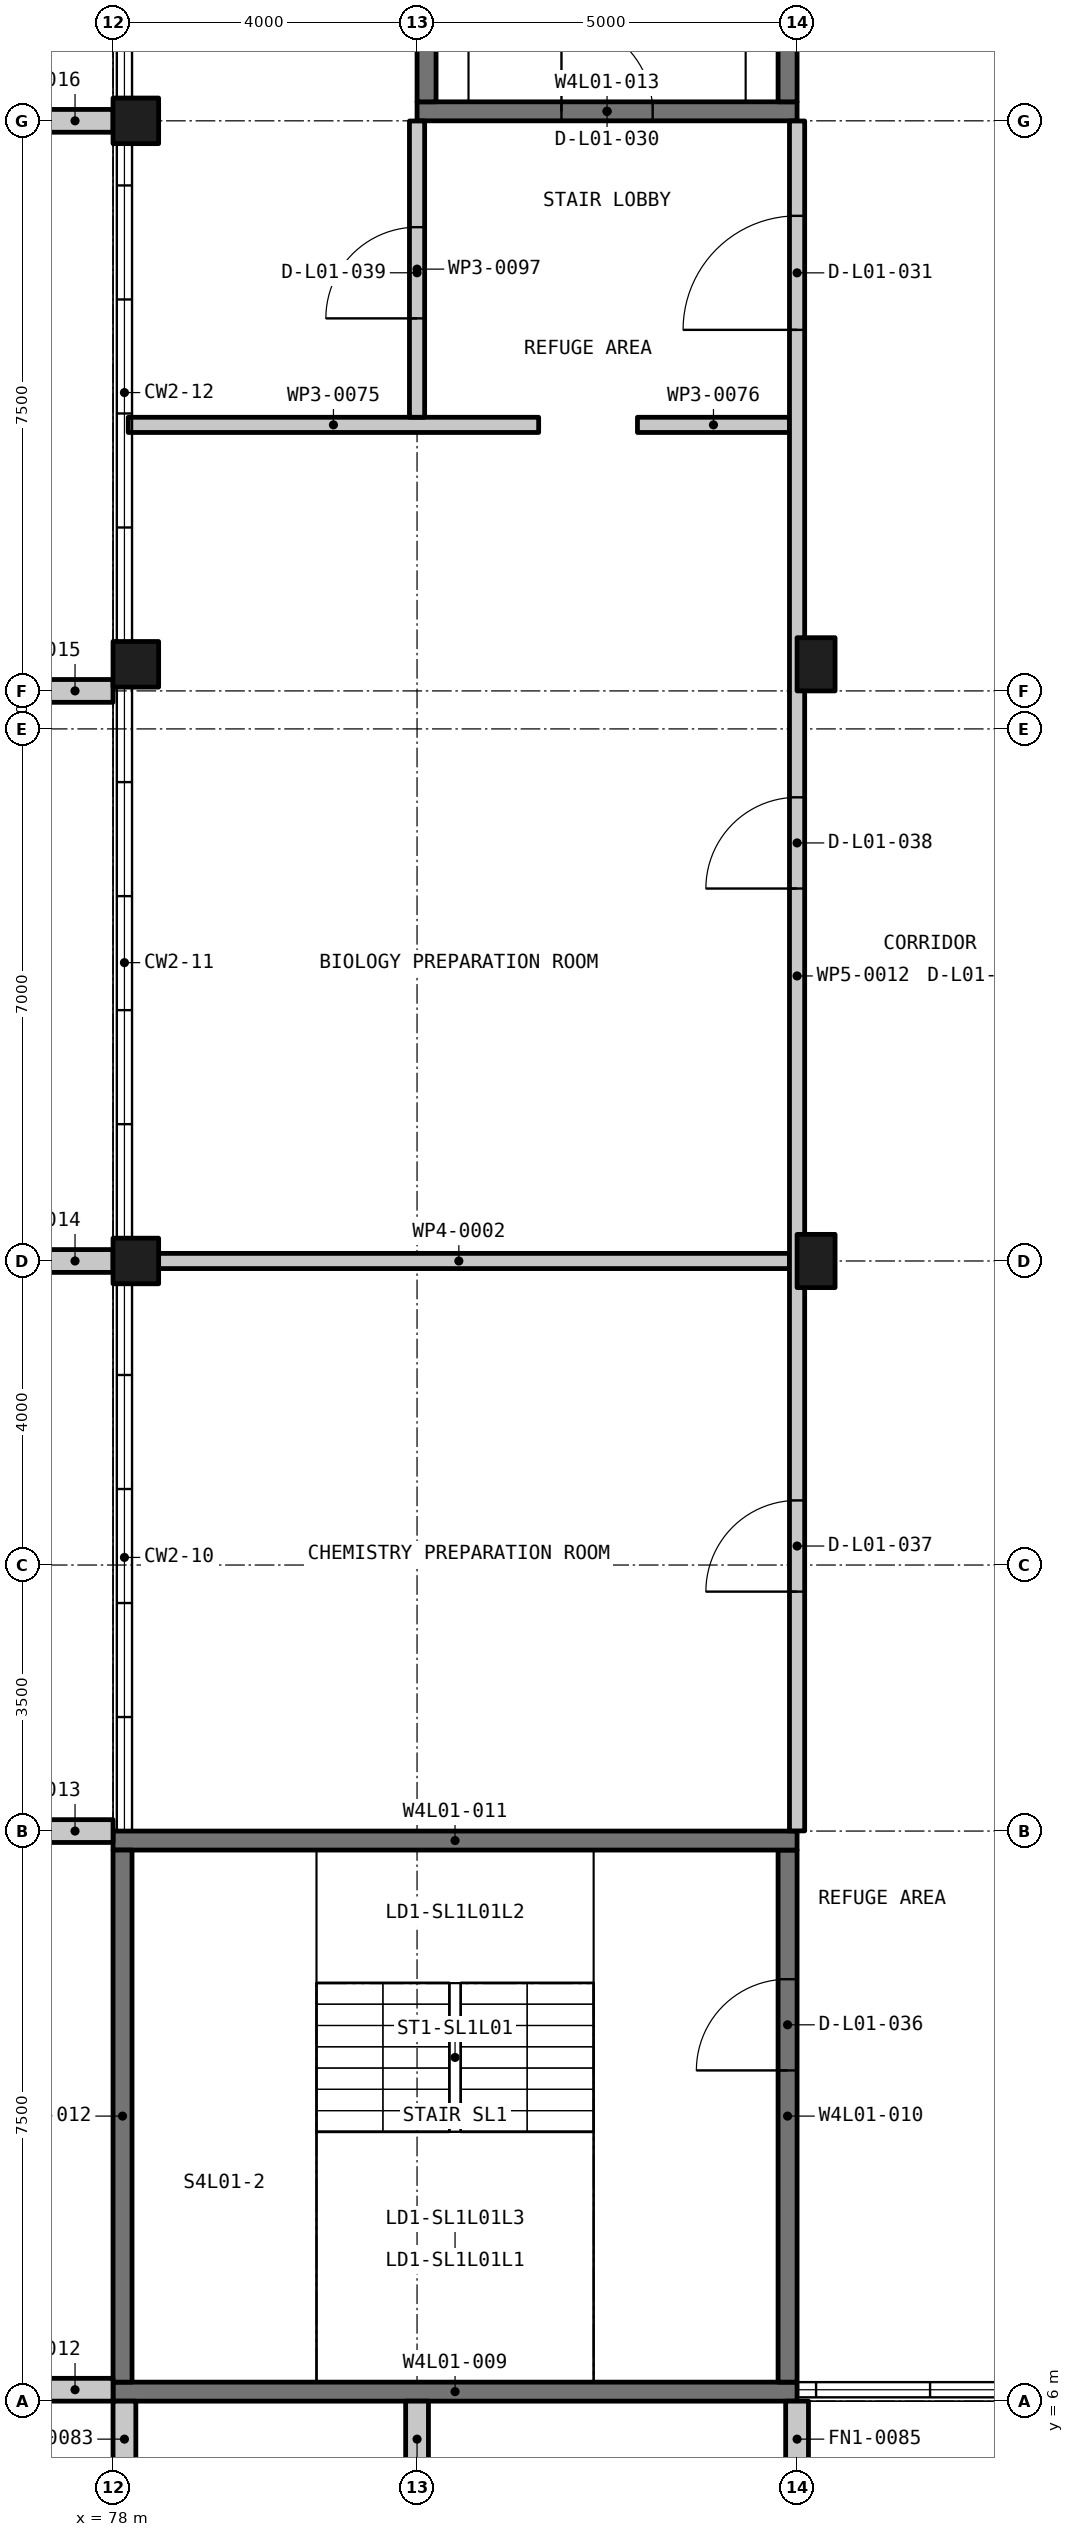
"""IFC4 building model, lengths in metres.
Left out: names, types, materials, properties, quantities, classifications, styles, units other than length and angle.
Written with IfcOpenShell. Run it as: python <this file> out.ifc"""

import sys

from ifc_helpers import new_model, si_unit, direction, frame, frame_2d, origin, origin_2d, place, context, subcontext, project, spatial, rectangle, extrude, element, fill, save


model = new_model("IFC4")
c1 = context("Model", 3, precision=1e-05, world=origin(), true_north=direction((0.0, 1.0)))
c2 = subcontext(c1, "Body", "Model", "MODEL_VIEW")
j1 = project(units=[si_unit("LENGTHUNIT", "METRE"), si_unit("PLANEANGLEUNIT", "RADIAN")], contexts=[c1])
p1 = place(None, origin())
s1 = spatial("IfcSite", under=j1, at=p1, CompositionType="ELEMENT")
p2 = place(p1, origin())
s2 = spatial("IfcBuilding", under=s1, at=p2, CompositionType="ELEMENT")
p3 = place(p2, frame((0.0, 0.0, 6.0)))
s3 = spatial("IfcBuildingStorey", under=s2, at=p3, CompositionType="ELEMENT", Elevation=6.0)
for number, where, z_axis, x_axis in (
    (1, (78.3, 21.0, -0.3), (0.0, 0.0, 1.0), (1.0, 0.0, 0.0)),
    (2, (78.3, 28.85, -0.3), (0.0, 0.0, 1.0), (1.0, 0.0, 0.0)),
    (3, (78.3, 36.0, -0.3), (0.0, 0.0, 1.0), (1.0, 0.0, 0.0)),
):
    element("IfcColumn", number, at=place(p3, frame(where, z_axis=z_axis, x_axis=x_axis)), inside=s3, PredefinedType="COLUMN", context=c2, shape_type="SweptSolid", body=[
        extrude(rectangle(XDim=0.6, YDim=0.6, at=origin_2d()), origin(), (0.0, 0.0, 1.0), 5.25),
    ])
for number, where, z_axis, x_axis in (
    (4, (87.25, 21.0, -0.3), (0.0, 0.0, 1.0), (1.0, 0.0, 0.0)),
    (5, (87.25, 28.85, -0.3), (0.0, 0.0, 1.0), (1.0, 0.0, 0.0)),
):
    element("IfcColumn", number, at=place(p3, frame(where, z_axis=z_axis, x_axis=x_axis)), inside=s3, PredefinedType="COLUMN", context=c2, shape_type="SweptSolid", body=[
        extrude(rectangle(XDim=0.5, YDim=0.7, at=origin_2d()), origin(), (0.0, 0.0, 1.0), 5.25),
    ])
p4 = place(p3, frame((78.0, 6.125, -0.3), z_axis=(0.0, 0.0, 1.0), x_axis=(1.0, 0.0, 0.0)))
e6 = element("IfcWall", 6, at=p4, inside=s3, PredefinedType="SHEAR", context=c2, shape_type="SweptSolid", body=[
    extrude(rectangle(XDim=9.0, YDim=0.25, at=frame_2d((4.5, 0.0))), origin(), (0.0, 0.0, 1.0), 5.25),
])
p5 = place(p3, frame((86.875, 6.25, -0.3), z_axis=(0.0, 0.0, 1.0), x_axis=(0.0, 1.0, 0.0)))
e7 = element("IfcWall", 7, at=p5, inside=s3, PredefinedType="SHEAR", context=c2, shape_type="SweptSolid", body=[
    extrude(rectangle(XDim=7.0, YDim=0.25, at=frame_2d((3.5, 0.0))), origin(), (0.0, 0.0, 1.0), 5.25),
])
p6 = place(p5, frame((4.101, 0.0, 0.3)))
e8 = element("IfcOpeningElement", 8, at=p6, cuts=e7, PredefinedType="OPENING", context=c2, shape_type="SweptSolid", body=[
    extrude(rectangle(XDim=1.2, YDim=2.2, at=frame_2d((0.6, 1.1))), frame((0.0, 0.135, 0.0), z_axis=(0.0, -1.0, 0.0), x_axis=(1.0, 0.0, 0.0)), (0.0, 0.0, 1.0), 0.27),
])
p7 = place(p3, frame((78.0, 13.375, -0.3), z_axis=(0.0, 0.0, 1.0), x_axis=(1.0, 0.0, 0.0)))
e9 = element("IfcWall", 9, at=p7, inside=s3, PredefinedType="SHEAR", context=c2, shape_type="SweptSolid", body=[
    extrude(rectangle(XDim=9.0, YDim=0.25, at=frame_2d((4.5, 0.0))), origin(), (0.0, 0.0, 1.0), 5.25),
])
p8 = place(p3, frame((78.125, 6.25, -0.3), z_axis=(0.0, 0.0, 1.0), x_axis=(0.0, 1.0, 0.0)))
e10 = element("IfcWall", 10, at=p8, inside=s3, PredefinedType="SHEAR", context=c2, shape_type="SweptSolid", body=[
    extrude(rectangle(XDim=7.0, YDim=0.25, at=frame_2d((3.5, 0.0))), origin(), (0.0, 0.0, 1.0), 5.25),
])
p9 = place(p3, frame((82.0, 36.125, -0.3), z_axis=(0.0, 0.0, 1.0), x_axis=(1.0, 0.0, 0.0)))
e11 = element("IfcWall", 11, at=p9, inside=s3, PredefinedType="SHEAR", context=c2, shape_type="SweptSolid", body=[
    extrude(rectangle(XDim=5.0, YDim=0.25, at=frame_2d((2.5, 0.0))), origin(), (0.0, 0.0, 1.0), 5.25),
])
p10 = place(p9, frame((1.9, 0.0, 0.3)))
e12 = element("IfcOpeningElement", 12, at=p10, cuts=e11, PredefinedType="OPENING", context=c2, shape_type="SweptSolid", body=[
    extrude(rectangle(XDim=1.2, YDim=2.2, at=frame_2d((0.6, 1.1))), frame((0.0, 0.135, 0.0), z_axis=(0.0, -1.0, 0.0), x_axis=(1.0, 0.0, 0.0)), (0.0, 0.0, 1.0), 0.27),
])
for number, where, z_axis, x_axis in (
    (13, (86.875, 36.25, -0.3), (0.0, 0.0, 1.0), (0.0, 1.0, 0.0)),
    (14, (82.125, 36.25, -0.3), (0.0, 0.0, 1.0), (0.0, 1.0, 0.0)),
):
    element("IfcWall", number, at=place(p3, frame(where, z_axis=z_axis, x_axis=x_axis)), inside=s3, PredefinedType="SHEAR", context=c2, shape_type="SweptSolid", body=[
        extrude(rectangle(XDim=7.0, YDim=0.25, at=frame_2d((3.5, 0.0))), origin(), (0.0, 0.0, 1.0), 5.25),
    ])
for number, where, z_axis, x_axis in (
    (15, (77.0, 6.15, 0.0), (0.0, 0.0, 1.0), (1.0, 0.0, 0.0)),
    (16, (77.0, 13.5, 0.0), (0.0, 0.0, 1.0), (1.0, 0.0, 0.0)),
    (17, (77.0, 21.0, 0.0), (0.0, 0.0, 1.0), (1.0, 0.0, 0.0)),
    (18, (77.0, 28.5, 0.0), (0.0, 0.0, 1.0), (1.0, 0.0, 0.0)),
    (19, (77.0, 36.0, 0.0), (0.0, 0.0, 1.0), (1.0, 0.0, 0.0)),
    (20, (78.15, 6.0, 0.0), (0.0, 0.0, 1.0), (0.0, -1.0, 0.0)),
    (21, (82.0, 6.0, 0.0), (0.0, 0.0, 1.0), (0.0, -1.0, 0.0)),
    (22, (87.0, 6.0, 0.0), (0.0, 0.0, 1.0), (0.0, -1.0, 0.0)),
):
    element("IfcWall", number, at=place(p3, frame(where, z_axis=z_axis, x_axis=x_axis)), inside=s3, PredefinedType="SOLIDWALL", context=c2, shape_type="SweptSolid", body=[
        extrude(rectangle(XDim=1.0, YDim=0.3, at=frame_2d((0.5, 0.0))), origin(), (0.0, 0.0, 1.0), 5.25),
    ])
p11 = place(p3, frame((78.2, 21.0, 0.0), z_axis=(0.0, 0.0, 1.0), x_axis=(1.0, 0.0, 0.0)))
e23 = element("IfcWall", 23, at=p11, inside=s3, PredefinedType="PARTITIONING", context=c2, shape_type="SweptSolid", body=[
    extrude(rectangle(XDim=8.7, YDim=0.2, at=frame_2d((4.35, 0.0))), origin(), (0.0, 0.0, 1.0), 4.15),
])
p12 = place(p3, frame((78.2, 32.0, 0.0), z_axis=(0.0, 0.0, 1.0), x_axis=(1.0, 0.0, 0.0)))
e24 = element("IfcWall", 24, at=p12, inside=s3, PredefinedType="PARTITIONING", context=c2, shape_type="SweptSolid", body=[
    extrude(rectangle(XDim=5.4, YDim=0.2, at=frame_2d((2.7, 0.0))), origin(), (0.0, 0.0, 1.0), 4.15),
])
p13 = place(p3, frame((84.9, 32.0, 0.0), z_axis=(0.0, 0.0, 1.0), x_axis=(1.0, 0.0, 0.0)))
e25 = element("IfcWall", 25, at=p13, inside=s3, PredefinedType="PARTITIONING", context=c2, shape_type="SweptSolid", body=[
    extrude(rectangle(XDim=2.0, YDim=0.2, at=frame_2d((1.0, 0.0))), origin(), (0.0, 0.0, 1.0), 4.95),
])
p14 = place(p3, frame((87.0, 13.502, 0.0), z_axis=(0.0, 0.0, 1.0), x_axis=(0.0, 1.0, 0.0)))
e26 = element("IfcWall", 26, at=p14, inside=s3, PredefinedType="PARTITIONING", context=c2, shape_type="SweptSolid", body=[
    extrude(rectangle(XDim=22.496, YDim=0.2, at=frame_2d((11.248, 0.0))), origin(), (0.0, 0.0, 1.0), 4.05),
])
p15 = place(p14, frame((19.748, 0.0, 0.0)))
e27 = element("IfcOpeningElement", 27, at=p15, cuts=e26, PredefinedType="OPENING", context=c2, shape_type="SweptSolid", body=[
    extrude(rectangle(XDim=1.5, YDim=2.1, at=frame_2d((0.75, 1.05))), frame((0.0, 0.11, 0.0), z_axis=(0.0, -1.0, 0.0), x_axis=(1.0, 0.0, 0.0)), (0.0, 0.0, 1.0), 0.22),
])
p16 = place(p14, frame((3.148, 0.0, 0.0)))
e28 = element("IfcOpeningElement", 28, at=p16, cuts=e26, PredefinedType="OPENING", context=c2, shape_type="SweptSolid", body=[
    extrude(rectangle(XDim=1.2, YDim=2.1, at=frame_2d((0.6, 1.05))), frame((0.0, 0.11, 0.0), z_axis=(0.0, -1.0, 0.0), x_axis=(1.0, 0.0, 0.0)), (0.0, 0.0, 1.0), 0.22),
])
p17 = place(p14, frame((12.398, 0.0, 0.0)))
e29 = element("IfcOpeningElement", 29, at=p17, cuts=e26, PredefinedType="OPENING", context=c2, shape_type="SweptSolid", body=[
    extrude(rectangle(XDim=1.2, YDim=2.1, at=frame_2d((0.6, 1.05))), frame((0.0, 0.11, 0.0), z_axis=(0.0, -1.0, 0.0), x_axis=(1.0, 0.0, 0.0)), (0.0, 0.0, 1.0), 0.22),
])
p18 = place(p3, frame((82.0, 32.1, 0.0), z_axis=(0.0, 0.0, 1.0), x_axis=(0.0, 1.0, 0.0)))
e30 = element("IfcWall", 30, at=p18, inside=s3, PredefinedType="PARTITIONING", context=c2, shape_type="SweptSolid", body=[
    extrude(rectangle(XDim=3.898, YDim=0.2, at=frame_2d((1.949, 0.0))), origin(), (0.0, 0.0, 1.0), 4.15),
])
p19 = place(p18, frame((1.301, 0.0, 0.0)))
e31 = element("IfcOpeningElement", 31, at=p19, cuts=e30, PredefinedType="OPENING", context=c2, shape_type="SweptSolid", body=[
    extrude(rectangle(XDim=1.2, YDim=2.1, at=frame_2d((0.6, 1.05))), frame((0.0, 0.11, 0.0), z_axis=(0.0, -1.0, 0.0), x_axis=(1.0, 0.0, 0.0)), (0.0, 0.0, 1.0), 0.22),
])
p20 = place(p10, origin())
e32 = element("IfcDoor", 32, at=p20, inside=s3, OperationType="SINGLE_SWING_LEFT", PredefinedType="DOOR", context=c2, shape_type="SweptSolid", body=[
    extrude(rectangle(XDim=1.2, YDim=2.2, at=frame_2d((0.6, 1.1))), frame((0.0, 0.025, 0.0), z_axis=(0.0, -1.0, 0.0), x_axis=(1.0, 0.0, 0.0)), (0.0, 0.0, 1.0), 0.05),
])
fill(e12, e32)
p21 = place(p15, origin())
e33 = element("IfcDoor", 33, at=p21, inside=s3, OperationType="DOUBLE_DOOR_SINGLE_SWING", PredefinedType="DOOR", context=c2, shape_type="SweptSolid", body=[
    extrude(rectangle(XDim=1.5, YDim=2.1, at=frame_2d((0.75, 1.05))), frame((0.0, 0.025, 0.0), z_axis=(0.0, -1.0, 0.0), x_axis=(1.0, 0.0, 0.0)), (0.0, 0.0, 1.0), 0.05),
])
fill(e27, e33)
p22 = place(p6, origin())
e34 = element("IfcDoor", 34, at=p22, inside=s3, OperationType="SINGLE_SWING_LEFT", PredefinedType="DOOR", context=c2, shape_type="SweptSolid", body=[
    extrude(rectangle(XDim=1.2, YDim=2.2, at=frame_2d((0.6, 1.1))), frame((0.0, 0.025, 0.0), z_axis=(0.0, -1.0, 0.0), x_axis=(1.0, 0.0, 0.0)), (0.0, 0.0, 1.0), 0.05),
])
fill(e8, e34)
p23 = place(p16, origin())
e35 = element("IfcDoor", 35, at=p23, inside=s3, OperationType="SINGLE_SWING_RIGHT", PredefinedType="DOOR", context=c2, shape_type="SweptSolid", body=[
    extrude(rectangle(XDim=1.2, YDim=2.1, at=frame_2d((0.6, 1.05))), frame((0.0, 0.025, 0.0), z_axis=(0.0, -1.0, 0.0), x_axis=(1.0, 0.0, 0.0)), (0.0, 0.0, 1.0), 0.05),
])
fill(e28, e35)
p24 = place(p17, origin())
e36 = element("IfcDoor", 36, at=p24, inside=s3, OperationType="SINGLE_SWING_LEFT", PredefinedType="DOOR", context=c2, shape_type="SweptSolid", body=[
    extrude(rectangle(XDim=1.2, YDim=2.1, at=frame_2d((0.6, 1.05))), frame((0.0, 0.025, 0.0), z_axis=(0.0, -1.0, 0.0), x_axis=(1.0, 0.0, 0.0)), (0.0, 0.0, 1.0), 0.05),
])
fill(e29, e36)
p25 = place(p19, origin())
e37 = element("IfcDoor", 37, at=p25, inside=s3, OperationType="SINGLE_SWING_RIGHT", PredefinedType="DOOR", context=c2, shape_type="SweptSolid", body=[
    extrude(rectangle(XDim=1.2, YDim=2.1, at=frame_2d((0.6, 1.05))), frame((0.0, 0.025, 0.0), z_axis=(0.0, -1.0, 0.0), x_axis=(1.0, 0.0, 0.0)), (0.0, 0.0, 1.0), 0.05),
])
fill(e31, e37)
save(model, sys.argv[1])
